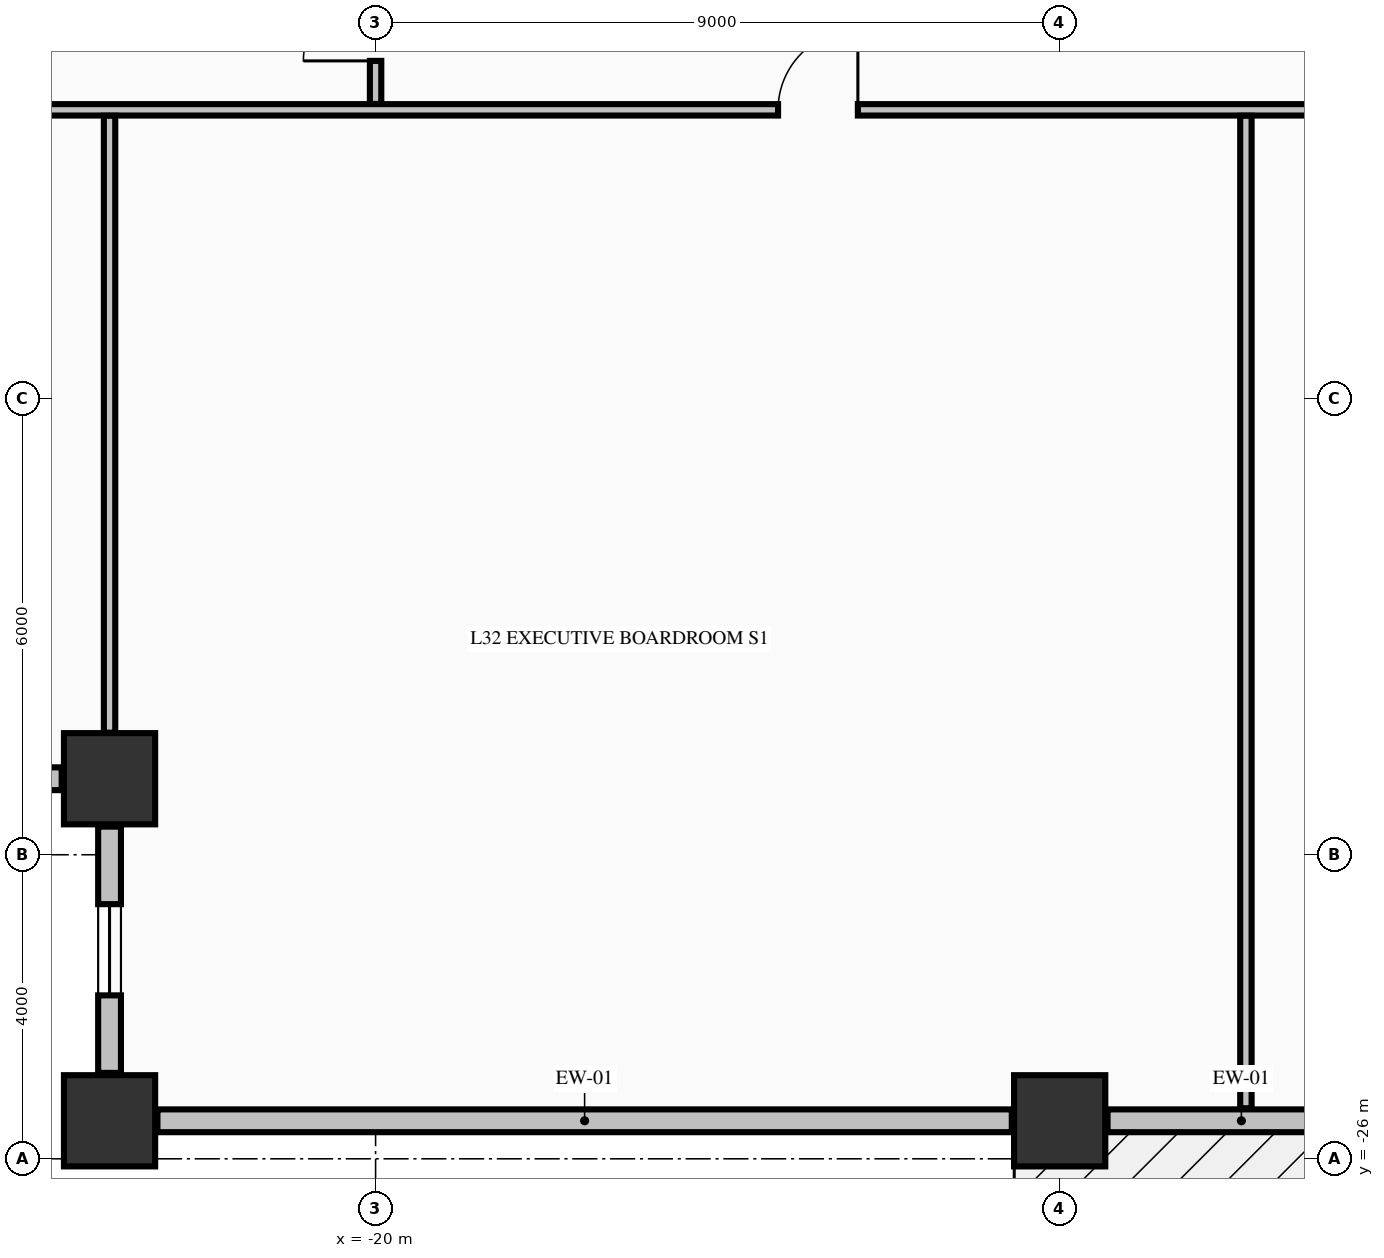
"""IFC4 building model, lengths in metres.
Left out: names, types, materials, properties, quantities, classifications, styles, units other than length and angle.
Written with IfcOpenShell. Run it as: python <this file> out.ifc"""

import sys

from ifc_helpers import new_model, si_unit, direction, frame, frame_2d, origin, origin_2d, place, context, subcontext, project, spatial, rectangle, extrude, element, fill, save


model = new_model("IFC4")
c1 = context("Model", 3, precision=1e-05, world=origin(), true_north=direction((0.0, 1.0)))
c2 = subcontext(c1, "Body", "Model", "MODEL_VIEW")
j1 = project(units=[si_unit("LENGTHUNIT", "METRE"), si_unit("PLANEANGLEUNIT", "RADIAN")], contexts=[c1])
p1 = place(None, origin())
s1 = spatial("IfcSite", under=j1, at=p1, CompositionType="ELEMENT")
p2 = place(p1, origin())
s2 = spatial("IfcBuilding", under=s1, at=p2, CompositionType="ELEMENT")
p3 = place(p2, frame((0.0, 0.0, 128.49)))
s3 = spatial("IfcBuildingStorey", under=s2, at=p3, CompositionType="ELEMENT", Elevation=128.49)
for number, where, z_axis, x_axis in (
    (1, (-23.5, -25.5, -0.25), (0.0, 0.0, 1.0), (1.0, 0.0, 0.0)),
    (2, (-11.0, -25.5, -0.25), (0.0, 0.0, 1.0), (1.0, 0.0, 0.0)),
    (3, (-23.5, -21.0, -0.25), (0.0, 0.0, 1.0), (1.0, 0.0, 0.0)),
):
    element("IfcColumn", number, at=place(p3, frame(where, z_axis=z_axis, x_axis=x_axis)), inside=s3, PredefinedType="COLUMN", context=c2, shape_type="SweptSolid", body=[
        extrude(rectangle(XDim=1.2, YDim=1.2, at=origin_2d()), origin(), (0.0, 0.0, 1.0), 3.57),
    ])
p4 = place(p3, frame((-27.37, -21.0, 0.0), z_axis=(0.0, 0.0, 1.0), x_axis=(1.0, 0.0, 0.0)))
e4 = element("IfcWall", 4, at=p4, inside=s3, PredefinedType="STANDARD", context=c2, shape_type="SweptSolid", body=[
    extrude(rectangle(XDim=3.24, YDim=0.3, at=frame_2d((1.62, 0.0))), origin(), (0.0, 0.0, 1.0), 2.712),
])
p5 = place(p4, frame((1.02, 0.0, 0.82)))
e5 = element("IfcOpeningElement", 5, at=p5, cuts=e4, PredefinedType="OPENING", context=c2, shape_type="SweptSolid", body=[
    extrude(rectangle(XDim=1.2, YDim=1.65, at=frame_2d((0.6, 0.825))), frame((0.0, 0.16, 0.0), z_axis=(0.0, -1.0, 0.0), x_axis=(1.0, 0.0, 0.0)), (0.0, 0.0, 1.0), 0.32),
])
p6 = place(p3, frame((-23.5, -21.63, 0.0), z_axis=(0.0, 0.0, 1.0), x_axis=(0.0, -1.0, 0.0)))
e6 = element("IfcWall", 6, at=p6, inside=s3, PredefinedType="STANDARD", context=c2, shape_type="SweptSolid", body=[
    extrude(rectangle(XDim=3.24, YDim=0.3, at=frame_2d((1.62, 0.0))), origin(), (0.0, 0.0, 1.0), 2.712),
])
p7 = place(p6, frame((1.02, 0.0, 0.82)))
e7 = element("IfcOpeningElement", 7, at=p7, cuts=e6, PredefinedType="OPENING", context=c2, shape_type="SweptSolid", body=[
    extrude(rectangle(XDim=1.2, YDim=1.65, at=frame_2d((0.6, 0.825))), frame((0.0, 0.16, 0.0), z_axis=(0.0, -1.0, 0.0), x_axis=(1.0, 0.0, 0.0)), (0.0, 0.0, 1.0), 0.32),
])
p8 = place(p3, frame((-22.87, -25.5, 0.0), z_axis=(0.0, 0.0, 1.0), x_axis=(1.0, 0.0, 0.0)))
e8 = element("IfcWall", 8, at=p8, inside=s3, PredefinedType="STANDARD", context=c2, shape_type="SweptSolid", body=[
    extrude(rectangle(XDim=11.24, YDim=0.3, at=frame_2d((5.62, 0.0))), origin(), (0.0, 0.0, 1.0), 2.712),
])
p9 = place(p3, frame((-10.37, -25.5, 0.0), z_axis=(0.0, 0.0, 1.0), x_axis=(1.0, 0.0, 0.0)))
e9 = element("IfcWall", 9, at=p9, inside=s3, PredefinedType="STANDARD", context=c2, shape_type="SweptSolid", body=[
    extrude(rectangle(XDim=9.74, YDim=0.3, at=frame_2d((4.87, 0.0))), origin(), (0.0, 0.0, 1.0), 2.712),
])
p10 = place(p9, frame((6.723, 0.0, 0.0)))
e10 = element("IfcOpeningElement", 10, at=p10, cuts=e9, PredefinedType="OPENING", context=c2, shape_type="SweptSolid", body=[
    extrude(rectangle(XDim=1.1, YDim=2.15, at=frame_2d((0.55, 1.075))), frame((0.0, 0.16, 0.0), z_axis=(0.0, -1.0, 0.0), x_axis=(1.0, 0.0, 0.0)), (0.0, 0.0, 1.0), 0.32),
])
p11 = place(p9, frame((3.071, 0.0, 0.8)))
e11 = element("IfcOpeningElement", 11, at=p11, cuts=e9, PredefinedType="OPENING", context=c2, shape_type="SweptSolid", body=[
    extrude(rectangle(XDim=1.65, YDim=1.7, at=frame_2d((0.825, 0.85))), frame((0.0, 0.16, 0.0), z_axis=(0.0, -1.0, 0.0), x_axis=(1.0, 0.0, 0.0)), (0.0, 0.0, 1.0), 0.32),
])
p12 = place(p3, frame((-27.835, -12.2, 0.0), z_axis=(0.0, 0.0, 1.0), x_axis=(1.0, 0.0, 0.0)))
e12 = element("IfcWall", 12, at=p12, inside=s3, PredefinedType="PARTITIONING", context=c2, shape_type="SweptSolid", body=[
    extrude(rectangle(XDim=50.67, YDim=0.15, at=frame_2d((25.335, 0.0))), origin(), (0.0, 0.0, 1.0), 3.32),
])
p13 = place(p12, frame((13.13, 0.0, 0.0)))
e13 = element("IfcOpeningElement", 13, at=p13, cuts=e12, PredefinedType="OPENING", context=c2, shape_type="SweptSolid", body=[
    extrude(rectangle(XDim=1.05, YDim=2.15, at=frame_2d((0.525, 1.075))), frame((0.0, 0.085, 0.0), z_axis=(0.0, -1.0, 0.0), x_axis=(1.0, 0.0, 0.0)), (0.0, 0.0, 1.0), 0.17),
])
p14 = place(p12, frame((24.26, 0.0, 0.0)))
e14 = element("IfcOpeningElement", 14, at=p14, cuts=e12, PredefinedType="OPENING", context=c2, shape_type="SweptSolid", body=[
    extrude(rectangle(XDim=1.05, YDim=2.15, at=frame_2d((0.525, 1.075))), frame((0.0, 0.085, 0.0), z_axis=(0.0, -1.0, 0.0), x_axis=(1.0, 0.0, 0.0)), (0.0, 0.0, 1.0), 0.17),
])
p15 = place(p12, frame((44.16, 0.0, 0.0)))
e15 = element("IfcOpeningElement", 15, at=p15, cuts=e12, PredefinedType="OPENING", context=c2, shape_type="SweptSolid", body=[
    extrude(rectangle(XDim=1.05, YDim=2.15, at=frame_2d((0.525, 1.075))), frame((0.0, 0.085, 0.0), z_axis=(0.0, -1.0, 0.0), x_axis=(1.0, 0.0, 0.0)), (0.0, 0.0, 1.0), 0.17),
])
p16 = place(p3, frame((-23.5, -20.394, 0.0), z_axis=(0.0, 0.0, 1.0), x_axis=(0.0, 1.0, 0.0)))
e16 = element("IfcWall", 16, at=p16, inside=s3, PredefinedType="PARTITIONING", context=c2, shape_type="SweptSolid", body=[
    extrude(rectangle(XDim=8.116, YDim=0.15, at=frame_2d((4.058, 0.0))), origin(), (0.0, 0.0, 1.0), 3.32),
])
p17 = place(p3, frame((-20.0, -12.122, 0.0), z_axis=(0.0, 0.0, 1.0), x_axis=(0.0, 1.0, 0.0)))
e17 = element("IfcWall", 17, at=p17, inside=s3, PredefinedType="PARTITIONING", context=c2, shape_type="SweptSolid", body=[
    extrude(rectangle(XDim=1.666, YDim=0.15, at=frame_2d((0.833, 0.0))), origin(), (0.0, 0.0, 1.0), 2.81),
])
p18 = place(p17, frame((0.566, 0.0, 0.0)))
e18 = element("IfcOpeningElement", 18, at=p18, cuts=e17, PredefinedType="OPENING", context=c2, shape_type="SweptSolid", body=[
    extrude(rectangle(XDim=0.95, YDim=2.15, at=frame_2d((0.475, 1.075))), frame((0.0, 0.085, 0.0), z_axis=(0.0, -1.0, 0.0), x_axis=(1.0, 0.0, 0.0)), (0.0, 0.0, 1.0), 0.17),
])
p19 = place(p3, frame((-8.55, -25.335, 0.0), z_axis=(0.0, 0.0, 1.0), x_axis=(0.0, 1.0, 0.0)))
e19 = element("IfcWall", 19, at=p19, inside=s3, PredefinedType="PARTITIONING", context=c2, shape_type="SweptSolid", body=[
    extrude(rectangle(XDim=13.057, YDim=0.15, at=frame_2d((6.528, 0.0))), origin(), (0.0, 0.0, 1.0), 3.32),
])
p20 = place(p7, origin())
e20 = element("IfcWindow", 20, at=p20, inside=s3, PartitioningType="SINGLE_PANEL", PredefinedType="WINDOW", context=c2, shape_type="SweptSolid", body=[
    extrude(rectangle(XDim=1.2, YDim=1.65, at=frame_2d((0.6, 0.825))), frame((0.0, 0.03, 0.0), z_axis=(0.0, -1.0, 0.0), x_axis=(1.0, 0.0, 0.0)), (0.0, 0.0, 1.0), 0.06),
])
fill(e7, e20)
p21 = place(p13, origin())
e21 = element("IfcDoor", 21, at=p21, inside=s3, OperationType="SINGLE_SWING_RIGHT", PredefinedType="DOOR", context=c2, shape_type="SweptSolid", body=[
    extrude(rectangle(XDim=1.05, YDim=2.15, at=frame_2d((0.525, 1.075))), frame((0.0, 0.025, 0.0), z_axis=(0.0, -1.0, 0.0), x_axis=(1.0, 0.0, 0.0)), (0.0, 0.0, 1.0), 0.05),
])
fill(e13, e21)
p22 = place(p18, origin())
e22 = element("IfcDoor", 22, at=p22, inside=s3, OperationType="SINGLE_SWING_LEFT", PredefinedType="DOOR", context=c2, shape_type="SweptSolid", body=[
    extrude(rectangle(XDim=0.95, YDim=2.15, at=frame_2d((0.475, 1.075))), frame((0.0, 0.025, 0.0), z_axis=(0.0, -1.0, 0.0), x_axis=(1.0, 0.0, 0.0)), (0.0, 0.0, 1.0), 0.05),
])
fill(e18, e22)
save(model, sys.argv[1])
